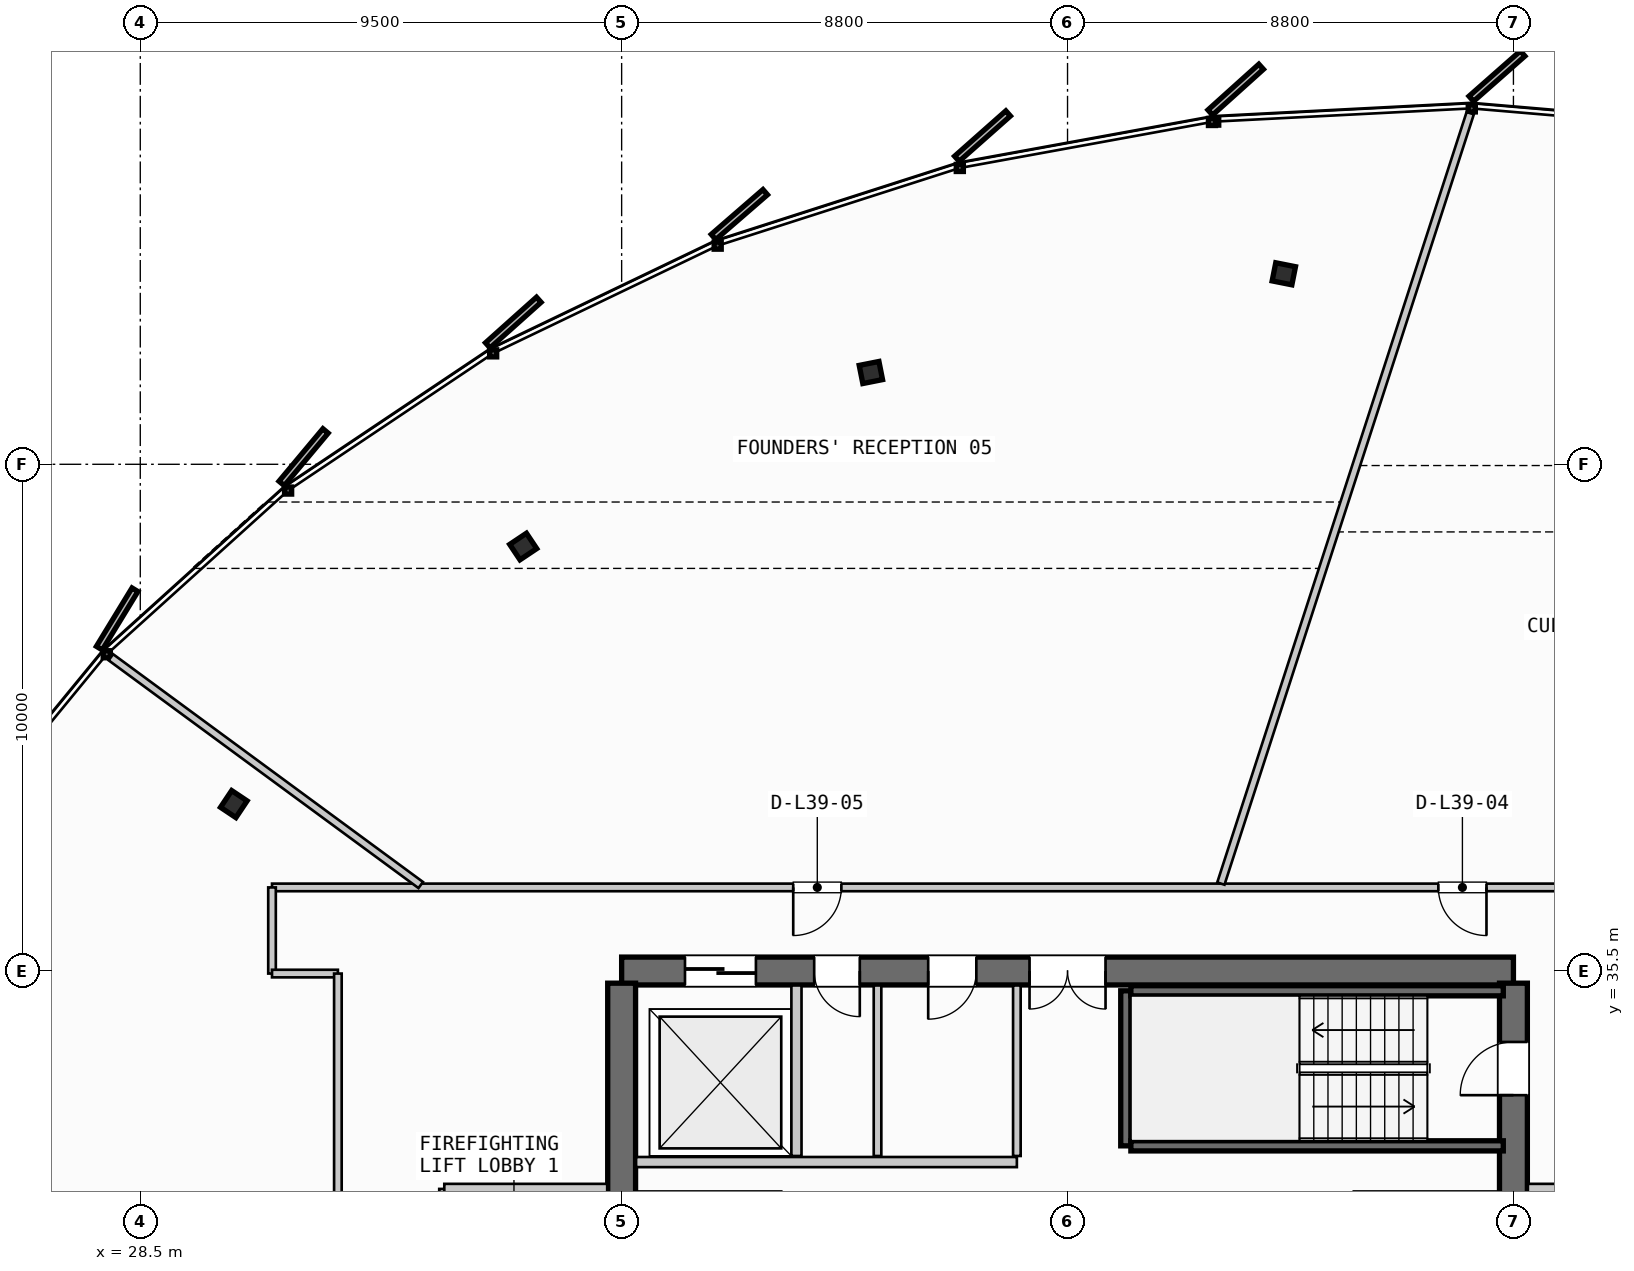
"""IFC4 building model, lengths in metres.
Left out: names, types, materials, properties, quantities, classifications, styles, units other than length and angle.
Written with IfcOpenShell. Run it as: python <this file> out.ifc"""

import sys

from ifc_helpers import new_model, si_unit, direction, frame, frame_2d, origin, origin_2d, place, context, subcontext, project, spatial, rectangle, i_section, extrude, source, transform, mapped, element, fill, save


model = new_model("IFC4")
c1 = context("Model", 3, precision=1e-05, world=origin(), true_north=direction((0.0, 1.0)))
c2 = subcontext(c1, "Body", "Model", "MODEL_VIEW")
j1 = project(units=[si_unit("LENGTHUNIT", "METRE"), si_unit("PLANEANGLEUNIT", "RADIAN")], contexts=[c1])
p1 = place(None, origin())
s1 = spatial("IfcSite", under=j1, at=p1, CompositionType="ELEMENT")
p2 = place(p1, origin())
s2 = spatial("IfcBuilding", under=s1, at=p2, CompositionType="ELEMENT")
p3 = place(p2, frame((0.0, 0.0, 153.65)))
s3 = spatial("IfcBuildingStorey", under=s2, at=p3, CompositionType="ELEMENT", Elevation=153.65)
p4 = place(p3, frame((55.6, 35.5, 0.0), z_axis=(0.0, 0.0, 1.0), x_axis=(-1.0, 0.0, 0.0)))
e1 = element("IfcWall", 1, at=p4, inside=s3, PredefinedType="SHEAR", context=c2, shape_type="SweptSolid", body=[
    extrude(rectangle(XDim=17.6, YDim=0.55, at=frame_2d((8.8, 0.0))), origin(), (0.0, 0.0, 1.0), 3.3),
])
p5 = place(p4, frame((8.05, 0.0, 0.0)))
e2 = element("IfcOpeningElement", 2, at=p5, cuts=e1, PredefinedType="OPENING", context=c2, shape_type="SweptSolid", body=[
    extrude(rectangle(XDim=1.5, YDim=2.2, at=frame_2d((0.75, 1.1))), frame((0.0, 0.285, 0.0), z_axis=(0.0, -1.0, 0.0), x_axis=(1.0, 0.0, 0.0)), (0.0, 0.0, 1.0), 0.57),
])
p6 = place(p4, frame((14.95, 0.0, 0.0)))
e3 = element("IfcOpeningElement", 3, at=p6, cuts=e1, PredefinedType="OPENING", context=c2, shape_type="SweptSolid", body=[
    extrude(rectangle(XDim=1.4, YDim=2.3, at=frame_2d((0.7, 1.15))), frame((0.0, 0.285, 0.0), z_axis=(0.0, -1.0, 0.0), x_axis=(1.0, 0.0, 0.0)), (0.0, 0.0, 1.0), 0.57),
])
p7 = place(p4, frame((12.9, 0.0, 0.0)))
e4 = element("IfcOpeningElement", 4, at=p7, cuts=e1, PredefinedType="OPENING", context=c2, shape_type="SweptSolid", body=[
    extrude(rectangle(XDim=0.9, YDim=2.15, at=frame_2d((0.45, 1.075))), frame((0.0, 0.285, 0.0), z_axis=(0.0, -1.0, 0.0), x_axis=(1.0, 0.0, 0.0)), (0.0, 0.0, 1.0), 0.57),
])
p8 = place(p4, frame((10.6, 0.0, 0.0)))
e5 = element("IfcOpeningElement", 5, at=p8, cuts=e1, PredefinedType="OPENING", context=c2, shape_type="SweptSolid", body=[
    extrude(rectangle(XDim=0.95, YDim=2.15, at=frame_2d((0.475, 1.075))), frame((0.0, 0.285, 0.0), z_axis=(0.0, -1.0, 0.0), x_axis=(1.0, 0.0, 0.0)), (0.0, 0.0, 1.0), 0.57),
])
p9 = place(p3, frame((38.0, 35.26, 0.0), z_axis=(0.0, 0.0, 1.0), x_axis=(0.0, -1.0, 0.0)))
e6 = element("IfcWall", 6, at=p9, inside=s3, PredefinedType="SHEAR", context=c2, shape_type="SweptSolid", body=[
    extrude(rectangle(XDim=14.92, YDim=0.55, at=frame_2d((7.46, 0.0))), origin(), (0.0, 0.0, 1.0), 3.3),
])
p10 = place(p9, frame((5.21, 0.0, 0.0)))
e7 = element("IfcOpeningElement", 7, at=p10, cuts=e6, PredefinedType="OPENING", context=c2, shape_type="SweptSolid", body=[
    extrude(rectangle(XDim=1.1, YDim=2.2, at=frame_2d((0.55, 1.1))), frame((0.0, 0.285, 0.0), z_axis=(0.0, -1.0, 0.0), x_axis=(1.0, 0.0, 0.0)), (0.0, 0.0, 1.0), 0.57),
])
p11 = place(p3, frame((55.6, 20.34, 0.0), z_axis=(0.0, 0.0, 1.0), x_axis=(0.0, 1.0, 0.0)))
e8 = element("IfcWall", 8, at=p11, inside=s3, PredefinedType="SHEAR", context=c2, shape_type="SweptSolid", body=[
    extrude(rectangle(XDim=14.92, YDim=0.55, at=frame_2d((7.46, 0.0))), origin(), (0.0, 0.0, 1.0), 3.3),
])
p12 = place(p11, frame((12.71, 0.0, 0.0)))
e9 = element("IfcOpeningElement", 9, at=p12, cuts=e8, PredefinedType="OPENING", context=c2, shape_type="SweptSolid", body=[
    extrude(rectangle(XDim=1.05, YDim=2.15, at=frame_2d((0.525, 1.075))), frame((0.0, 0.285, 0.0), z_axis=(0.0, -1.0, 0.0), x_axis=(1.0, 0.0, 0.0)), (0.0, 0.0, 1.0), 0.57),
])
p13 = place(p11, frame((8.61, 0.0, 0.0)))
e10 = element("IfcOpeningElement", 10, at=p13, cuts=e8, PredefinedType="OPENING", context=c2, shape_type="SweptSolid", body=[
    extrude(rectangle(XDim=1.1, YDim=2.2, at=frame_2d((0.55, 1.1))), frame((0.0, 0.285, 0.0), z_axis=(0.0, -1.0, 0.0), x_axis=(1.0, 0.0, 0.0)), (0.0, 0.0, 1.0), 0.57),
])
m1 = source(origin(), c2, "Body", "SweptSolid", [
    extrude(i_section(OverallWidth=0.397, OverallDepth=0.365, WebThickness=0.028, FlangeThickness=0.044, FilletRadius=0.015, at=origin_2d()), origin(), (0.0, 0.0, 1.0), 3.3),
])
for number, where, z_axis, x_axis in (
    (11, (51.069, 49.259, 0.0), (0.0, 0.0, 1.0), (0.195, 0.981, 0.0)),
    (12, (42.919, 47.311, 0.0), (0.0, 0.0, 1.0), (-0.195, 0.981, 0.0)),
    (13, (36.058, 43.877, 0.0), (0.0, 0.0, 1.0), (-0.556, 0.831, 0.0)),
    (14, (30.346, 38.794, 0.0), (0.0, 0.0, 1.0), (-0.831, 0.556, 0.0)),
):
    element("IfcColumn", number, at=place(p3, frame(where, z_axis=z_axis, x_axis=x_axis)), inside=s3, PredefinedType="COLUMN", context=c2, shape_type="MappedRepresentation", body=[
        mapped(m1, transform((0.0, 0.0, 0.0), scale=1.0)),
    ])
p14 = place(p3, frame((47.95, 32.05, 0.0), z_axis=(0.0, 0.0, 1.0), x_axis=(0.0, 1.0, 0.0)))
e15 = element("IfcWall", 15, at=p14, inside=s3, PredefinedType="SHEAR", context=c2, shape_type="SweptSolid", body=[
    extrude(rectangle(XDim=3.06, YDim=0.2, at=frame_2d((1.53, 0.0))), origin(), (0.0, 0.0, 1.0), 3.3),
])
for number, where, z_axis, x_axis in (
    (16, (48.05, 35.11, 0.0), (0.0, 0.0, 1.0), (1.0, 0.0, 0.0)),
    (17, (55.4, 32.05, 0.0), (0.0, 0.0, 1.0), (-1.0, 0.0, 0.0)),
):
    element("IfcWall", number, at=place(p3, frame(where, z_axis=z_axis, x_axis=x_axis)), inside=s3, PredefinedType="SHEAR", context=c2, shape_type="SweptSolid", body=[
        extrude(rectangle(XDim=7.35, YDim=0.2, at=frame_2d((3.675, 0.0))), origin(), (0.0, 0.0, 1.0), 3.3),
    ])
p15 = place(p3, frame((38.285, 31.05, 0.0), z_axis=(0.0, 0.0, 1.0), x_axis=(1.0, 0.0, 0.0)))
e18 = element("IfcWall", 18, at=p15, inside=s3, PredefinedType="PARTITIONING", context=c2, shape_type="SweptSolid", body=[
    extrude(rectangle(XDim=2.865, YDim=0.2, at=frame_2d((1.433, 0.0))), origin(), (0.0, 0.0, 1.0), 2.28),
])
p16 = place(p3, frame((34.5, 31.2, 0.0), z_axis=(0.0, 0.0, 1.0), x_axis=(0.0, -1.0, 0.0)))
e19 = element("IfcWall", 19, at=p16, inside=s3, PredefinedType="PARTITIONING", context=c2, shape_type="SweptSolid", body=[
    extrude(rectangle(XDim=4.4, YDim=0.2, at=frame_2d((2.2, 0.0))), origin(), (0.0, 0.0, 1.0), 2.28),
])
p17 = place(p16, frame((1.65, 0.0, 0.0)))
e20 = element("IfcOpeningElement", 20, at=p17, cuts=e19, PredefinedType="OPENING", context=c2, shape_type="SweptSolid", body=[
    extrude(rectangle(XDim=1.05, YDim=2.15, at=frame_2d((0.525, 1.075))), frame((0.0, 0.11, 0.0), z_axis=(0.0, -1.0, 0.0), x_axis=(1.0, 0.0, 0.0)), (0.0, 0.0, 1.0), 0.22),
])
p18 = place(p3, frame((34.5, 31.2, 0.0), z_axis=(0.0, 0.0, 1.0), x_axis=(1.0, 0.0, 0.0)))
e21 = element("IfcWall", 21, at=p18, inside=s3, PredefinedType="PARTITIONING", context=c2, shape_type="SweptSolid", body=[
    extrude(rectangle(XDim=3.215, YDim=0.2, at=frame_2d((1.607, 0.0))), origin(), (0.0, 0.0, 1.0), 2.28),
])
p19 = place(p3, frame((52.45, 31.05, 0.0), z_axis=(0.0, 0.0, 1.0), x_axis=(1.0, 0.0, 0.0)))
e22 = element("IfcWall", 22, at=p19, inside=s3, PredefinedType="PARTITIONING", context=c2, shape_type="SweptSolid", body=[
    extrude(rectangle(XDim=2.865, YDim=0.2, at=frame_2d((1.433, 0.0))), origin(), (0.0, 0.0, 1.0), 2.28),
])
p20 = place(p3, frame((55.885, 31.2, 0.0), z_axis=(0.0, 0.0, 1.0), x_axis=(1.0, 0.0, 0.0)))
e23 = element("IfcWall", 23, at=p20, inside=s3, PredefinedType="PARTITIONING", context=c2, shape_type="SweptSolid", body=[
    extrude(rectangle(XDim=3.215, YDim=0.2, at=frame_2d((1.607, 0.0))), origin(), (0.0, 0.0, 1.0), 2.28),
])
p21 = place(p3, frame((41.45, 31.85, 0.0), z_axis=(0.0, 0.0, 1.0), x_axis=(0.0, 1.0, 0.0)))
e24 = element("IfcWall", 24, at=p21, inside=s3, PredefinedType="PARTITIONING", context=c2, shape_type="SweptSolid", body=[
    extrude(rectangle(XDim=3.365, YDim=0.2, at=frame_2d((1.683, 0.0))), origin(), (0.0, 0.0, 1.0), 2.28),
])
p22 = place(p3, frame((38.285, 31.73, 0.0), z_axis=(0.0, 0.0, 1.0), x_axis=(1.0, 0.0, 0.0)))
e25 = element("IfcWall", 25, at=p22, inside=s3, PredefinedType="PARTITIONING", context=c2, shape_type="SweptSolid", body=[
    extrude(rectangle(XDim=7.515, YDim=0.2, at=frame_2d((3.758, 0.0))), origin(), (0.0, 0.0, 1.0), 2.28),
])
p23 = place(p3, frame((45.8, 31.85, 0.0), z_axis=(0.0, 0.0, 1.0), x_axis=(0.0, 1.0, 0.0)))
e26 = element("IfcWall", 26, at=p23, inside=s3, PredefinedType="PARTITIONING", context=c2, shape_type="SweptSolid", body=[
    extrude(rectangle(XDim=3.365, YDim=0.15, at=frame_2d((1.683, 0.0))), origin(), (0.0, 0.0, 1.0), 2.28),
])
p24 = place(p3, frame((43.05, 31.85, 0.0), z_axis=(0.0, 0.0, 1.0), x_axis=(0.0, 1.0, 0.0)))
e27 = element("IfcWall", 27, at=p24, inside=s3, PredefinedType="PLUMBINGWALL", context=c2, shape_type="SweptSolid", body=[
    extrude(rectangle(XDim=3.365, YDim=0.15, at=frame_2d((1.683, 0.0))), origin(), (0.0, 0.0, 1.0), 2.28),
])
p25 = place(p3, frame((62.5, 37.15, 0.0), z_axis=(0.0, 0.0, 1.0), x_axis=(-1.0, 0.0, 0.0)))
e28 = element("IfcWall", 28, at=p25, inside=s3, PredefinedType="PARTITIONING", context=c2, shape_type="SweptSolid", body=[
    extrude(rectangle(XDim=31.4, YDim=0.15, at=frame_2d((15.7, 0.0))), origin(), (0.0, 0.0, 1.0), 2.28),
])
p26 = place(p25, frame((7.432, 0.0, 0.0)))
e29 = element("IfcOpeningElement", 29, at=p26, cuts=e28, PredefinedType="OPENING", context=c2, shape_type="SweptSolid", body=[
    extrude(rectangle(XDim=0.95, YDim=2.15, at=frame_2d((0.475, 1.075))), frame((0.0, 0.085, 0.0), z_axis=(0.0, -1.0, 0.0), x_axis=(1.0, 0.0, 0.0)), (0.0, 0.0, 1.0), 0.17),
])
p27 = place(p25, frame((20.164, 0.0, 0.0)))
e30 = element("IfcOpeningElement", 30, at=p27, cuts=e28, PredefinedType="OPENING", context=c2, shape_type="SweptSolid", body=[
    extrude(rectangle(XDim=0.95, YDim=2.15, at=frame_2d((0.475, 1.075))), frame((0.0, 0.085, 0.0), z_axis=(0.0, -1.0, 0.0), x_axis=(1.0, 0.0, 0.0)), (0.0, 0.0, 1.0), 0.17),
])
p28 = place(p3, frame((31.1, 37.15, 0.0), z_axis=(0.0, 0.0, 1.0), x_axis=(0.0, -1.0, 0.0)))
e31 = element("IfcWall", 31, at=p28, inside=s3, PredefinedType="PARTITIONING", context=c2, shape_type="SweptSolid", body=[
    extrude(rectangle(XDim=1.7, YDim=0.15, at=frame_2d((0.85, 0.0))), origin(), (0.0, 0.0, 1.0), 2.28),
])
p29 = place(p3, frame((31.1, 35.45, 0.0), z_axis=(0.0, 0.0, 1.0), x_axis=(1.0, 0.0, 0.0)))
e32 = element("IfcWall", 32, at=p29, inside=s3, PredefinedType="PARTITIONING", context=c2, shape_type="SweptSolid", body=[
    extrude(rectangle(XDim=1.3, YDim=0.15, at=frame_2d((0.65, 0.0))), origin(), (0.0, 0.0, 1.0), 2.28),
])
p30 = place(p3, frame((32.4, 35.45, 0.0), z_axis=(0.0, 0.0, 1.0), x_axis=(0.0, -1.0, 0.0)))
e33 = element("IfcWall", 33, at=p30, inside=s3, PredefinedType="PARTITIONING", context=c2, shape_type="SweptSolid", body=[
    extrude(rectangle(XDim=15.3, YDim=0.15, at=frame_2d((7.65, 0.0))), origin(), (0.0, 0.0, 1.0), 2.28),
])
p31 = place(p30, frame((7.175, 0.0, 0.0)))
e34 = element("IfcOpeningElement", 34, at=p31, cuts=e33, PredefinedType="OPENING", context=c2, shape_type="SweptSolid", body=[
    extrude(rectangle(XDim=0.95, YDim=2.15, at=frame_2d((0.475, 1.075))), frame((0.0, 0.085, 0.0), z_axis=(0.0, -1.0, 0.0), x_axis=(1.0, 0.0, 0.0)), (0.0, 0.0, 1.0), 0.17),
])
p32 = place(p3, frame((49.826, 37.226, 0.0), z_axis=(0.0, 0.0, 1.0), x_axis=(0.307956150851, 0.951400551373, 0.0)))
e35 = element("IfcWall", 35, at=p32, inside=s3, PredefinedType="PARTITIONING", context=c2, shape_type="SweptSolid", body=[
    extrude(rectangle(XDim=15.979, YDim=0.15, at=frame_2d((7.99, 0.0))), origin(), (0.0, 0.0, 1.0), 2.28),
])
p33 = place(p3, frame((34.035, 37.198, 0.0), z_axis=(0.0, 0.0, 1.0), x_axis=(-0.805757118537, 0.592246119386, 0.0)))
e36 = element("IfcWall", 36, at=p33, inside=s3, PredefinedType="PARTITIONING", context=c2, shape_type="SweptSolid", body=[
    extrude(rectangle(XDim=7.589, YDim=0.15, at=frame_2d((3.794, 0.0))), origin(), (0.0, 0.0, 1.0), 2.28),
])
m2 = source(origin(), c2, "Body", "SweptSolid", [
    extrude(rectangle(XDim=1.05, YDim=2.15, at=frame_2d((0.525, 1.075))), frame((0.0, 0.025, 0.0), z_axis=(0.0, -1.0, 0.0), x_axis=(1.0, 0.0, 0.0)), (0.0, 0.0, 1.0), 0.05),
])
p34 = place(p12, origin())
e37 = element("IfcDoor", 37, at=p34, inside=s3, OperationType="SINGLE_SWING_LEFT", PredefinedType="DOOR", context=c2, shape_type="MappedRepresentation", body=[
    mapped(m2, transform((0.0, 0.0, 0.0), scale=1.0)),
])
fill(e9, e37)
m3 = source(origin(), c2, "Body", "SweptSolid", [
    extrude(rectangle(XDim=1.5, YDim=2.2, at=frame_2d((0.75, 1.1))), frame((0.0, 0.025, 0.0), z_axis=(0.0, -1.0, 0.0), x_axis=(1.0, 0.0, 0.0)), (0.0, 0.0, 1.0), 0.05),
])
p35 = place(p5, origin())
e38 = element("IfcDoor", 38, at=p35, inside=s3, OperationType="DOUBLE_DOOR_SINGLE_SWING", PredefinedType="DOOR", context=c2, shape_type="MappedRepresentation", body=[
    mapped(m3, transform((0.0, 0.0, 0.0), scale=1.0)),
])
fill(e2, e38)
m4 = source(origin(), c2, "Body", "SweptSolid", [
    extrude(rectangle(XDim=1.4, YDim=2.3, at=frame_2d((0.7, 1.15))), frame((0.0, 0.025, 0.0), z_axis=(0.0, -1.0, 0.0), x_axis=(1.0, 0.0, 0.0)), (0.0, 0.0, 1.0), 0.05),
])
p36 = place(p6, origin())
e39 = element("IfcDoor", 39, at=p36, inside=s3, OperationType="SLIDING_TO_RIGHT", PredefinedType="DOOR", context=c2, shape_type="MappedRepresentation", body=[
    mapped(m4, transform((0.0, 0.0, 0.0), scale=1.0)),
])
fill(e3, e39)
m5 = source(origin(), c2, "Body", "SweptSolid", [
    extrude(rectangle(XDim=0.9, YDim=2.15, at=frame_2d((0.45, 1.075))), frame((0.0, 0.025, 0.0), z_axis=(0.0, -1.0, 0.0), x_axis=(1.0, 0.0, 0.0)), (0.0, 0.0, 1.0), 0.05),
])
p37 = place(p7, origin())
e40 = element("IfcDoor", 40, at=p37, inside=s3, OperationType="SINGLE_SWING_LEFT", PredefinedType="DOOR", context=c2, shape_type="MappedRepresentation", body=[
    mapped(m5, transform((0.0, 0.0, 0.0), scale=1.0)),
])
fill(e4, e40)
m6 = source(origin(), c2, "Body", "SweptSolid", [
    extrude(rectangle(XDim=0.95, YDim=2.15, at=frame_2d((0.475, 1.075))), frame((0.0, 0.025, 0.0), z_axis=(0.0, -1.0, 0.0), x_axis=(1.0, 0.0, 0.0)), (0.0, 0.0, 1.0), 0.05),
])
p38 = place(p8, origin())
e41 = element("IfcDoor", 41, at=p38, inside=s3, OperationType="SINGLE_SWING_RIGHT", PredefinedType="DOOR", context=c2, shape_type="MappedRepresentation", body=[
    mapped(m6, transform((0.0, 0.0, 0.0), scale=1.0)),
])
fill(e5, e41)
p39 = place(p26, origin())
e42 = element("IfcDoor", 42, at=p39, inside=s3, OperationType="SINGLE_SWING_LEFT", PredefinedType="DOOR", context=c2, shape_type="MappedRepresentation", body=[
    mapped(m6, transform((0.0, 0.0, 0.0), scale=1.0)),
])
fill(e29, e42)
p40 = place(p27, origin())
e43 = element("IfcDoor", 43, at=p40, inside=s3, OperationType="SINGLE_SWING_RIGHT", PredefinedType="DOOR", context=c2, shape_type="MappedRepresentation", body=[
    mapped(m6, transform((0.0, 0.0, 0.0), scale=1.0)),
])
fill(e30, e43)
save(model, sys.argv[1])
